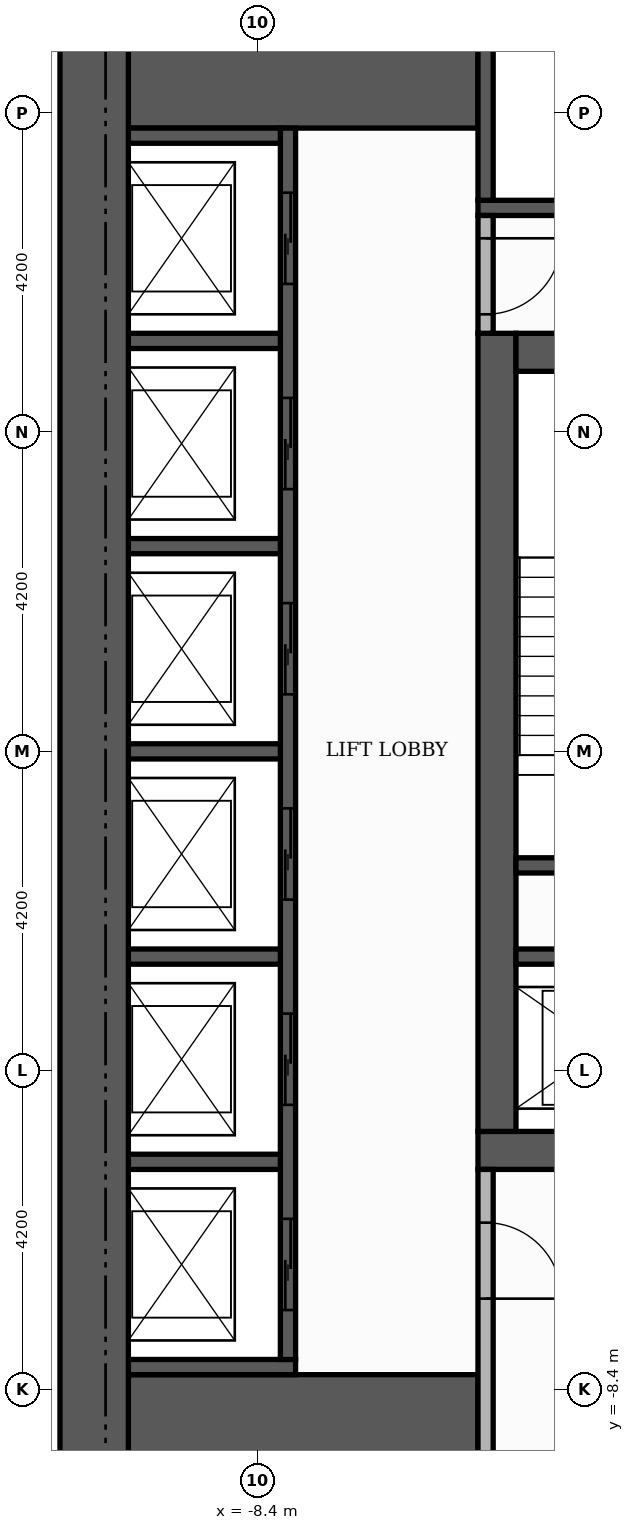
"""IFC4 building model, lengths in metres.
Left out: names, types, materials, properties, quantities, classifications, styles, units other than length and angle.
Written with IfcOpenShell. Run it as: python <this file> out.ifc"""

import sys

from ifc_helpers import new_model, si_unit, direction, frame, frame_2d, origin, place, context, subcontext, project, spatial, rectangle, extrude, element, fill, save


model = new_model("IFC4")
c1 = context("Model", 3, precision=1e-05, world=origin(), true_north=direction((0.0, 1.0)))
c2 = subcontext(c1, "Body", "Model", "MODEL_VIEW")
j1 = project(units=[si_unit("LENGTHUNIT", "METRE"), si_unit("PLANEANGLEUNIT", "RADIAN")], contexts=[c1])
p1 = place(None, origin())
s1 = spatial("IfcSite", under=j1, at=p1, CompositionType="ELEMENT")
p2 = place(p1, origin())
s2 = spatial("IfcBuilding", under=s1, at=p2, CompositionType="ELEMENT")
p3 = place(p2, frame((0.0, 0.0, 38.7)))
s3 = spatial("IfcBuildingStorey", under=s2, at=p3, CompositionType="ELEMENT", Elevation=38.7)
p4 = place(p3, frame((-5.5, -5.25, 0.0), z_axis=(0.0, 0.0, 1.0), x_axis=(1.0, 0.0, 0.0)))
e1 = element("IfcWall", 1, at=p4, inside=s3, PredefinedType="SHEAR", context=c2, shape_type="SweptSolid", body=[
    extrude(rectangle(XDim=11.0, YDim=0.5, at=frame_2d((5.5, 0.0))), origin(), (0.0, 0.0, 1.0), 3.48),
])
p5 = place(p4, frame((4.9, 0.0, 0.0)))
e2 = element("IfcOpeningElement", 2, at=p5, cuts=e1, PredefinedType="OPENING", context=c2, shape_type="SweptSolid", body=[
    extrude(rectangle(XDim=1.2, YDim=2.1, at=frame_2d((0.6, 1.05))), frame((0.0, 0.26, 0.0), z_axis=(0.0, -1.0, 0.0), x_axis=(1.0, 0.0, 0.0)), (0.0, 0.0, 1.0), 0.52),
])
p6 = place(p3, frame((-5.25, -5.0, 0.0), z_axis=(0.0, 0.0, 1.0), x_axis=(0.0, 1.0, 0.0)))
e3 = element("IfcWall", 3, at=p6, inside=s3, PredefinedType="SHEAR", context=c2, shape_type="SweptSolid", body=[
    extrude(rectangle(XDim=10.5, YDim=0.5, at=frame_2d((5.25, 0.0))), origin(), (0.0, 0.0, 1.0), 3.48),
])
p7 = place(p3, frame((-5.0, 5.25, 0.0), z_axis=(0.0, 0.0, 1.0), x_axis=(1.0, 0.0, 0.0)))
e4 = element("IfcWall", 4, at=p7, inside=s3, PredefinedType="SHEAR", context=c2, shape_type="SweptSolid", body=[
    extrude(rectangle(XDim=10.0, YDim=0.5, at=frame_2d((5.0, 0.0))), origin(), (0.0, 0.0, 1.0), 3.48),
])
p8 = place(p7, frame((4.4, 0.0, 0.0)))
e5 = element("IfcOpeningElement", 5, at=p8, cuts=e4, PredefinedType="OPENING", context=c2, shape_type="SweptSolid", body=[
    extrude(rectangle(XDim=1.2, YDim=2.1, at=frame_2d((0.6, 1.05))), frame((0.0, 0.26, 0.0), z_axis=(0.0, -1.0, 0.0), x_axis=(1.0, 0.0, 0.0)), (0.0, 0.0, 1.0), 0.52),
])
for number, where, z_axis, x_axis in (
    (6, (-10.1, -9.15, 0.0), (0.0, 0.0, 1.0), (1.0, 0.0, 0.0)),
    (7, (-10.1, 9.15, 0.0), (0.0, 0.0, 1.0), (1.0, 0.0, 0.0)),
):
    element("IfcWall", number, at=place(p3, frame(where, z_axis=z_axis, x_axis=x_axis)), inside=s3, PredefinedType="SHEAR", context=c2, shape_type="SweptSolid", body=[
        extrude(rectangle(XDim=4.6, YDim=1.9, at=frame_2d((2.3, 0.0))), origin(), (0.0, 0.0, 1.0), 3.48),
    ])
p9 = place(p3, frame((-5.0, -1.5, 0.0), z_axis=(0.0, 0.0, 1.0), x_axis=(1.0, 0.0, 0.0)))
e8 = element("IfcWall", 8, at=p9, inside=s3, PredefinedType="SHEAR", context=c2, shape_type="SweptSolid", body=[
    extrude(rectangle(XDim=3.05, YDim=0.2, at=frame_2d((1.525, 0.0))), origin(), (0.0, 0.0, 1.0), 3.48),
])
p10 = place(p3, frame((-5.5, 7.15, 0.0), z_axis=(0.0, 0.0, 1.0), x_axis=(1.0, 0.0, 0.0)))
e9 = element("IfcWall", 9, at=p10, inside=s3, PredefinedType="SHEAR", context=c2, shape_type="SweptSolid", body=[
    extrude(rectangle(XDim=6.8, YDim=0.2, at=frame_2d((3.4, 0.0))), origin(), (0.0, 0.0, 1.0), 3.48),
])
p11 = place(p3, frame((-5.4, 7.25, 0.0), z_axis=(0.0, 0.0, 1.0), x_axis=(0.0, 1.0, 0.0)))
e10 = element("IfcWall", 10, at=p11, inside=s3, PredefinedType="SHEAR", context=c2, shape_type="SweptSolid", body=[
    extrude(rectangle(XDim=2.85, YDim=0.2, at=frame_2d((1.425, 0.0))), origin(), (0.0, 0.0, 1.0), 3.48),
])
p12 = place(p3, frame((-10.1, -8.1, 0.0), z_axis=(0.0, 0.0, 1.0), x_axis=(1.0, 0.0, 0.0)))
e11 = element("IfcWall", 11, at=p12, inside=s3, PredefinedType="SHEAR", context=c2, shape_type="SweptSolid", body=[
    extrude(rectangle(XDim=2.2, YDim=0.2, at=frame_2d((1.1, 0.0))), origin(), (0.0, 0.0, 1.0), 3.48),
])
p13 = place(p3, frame((-8.0, -8.0, 0.0), z_axis=(0.0, 0.0, 1.0), x_axis=(0.0, 1.0, 0.0)))
e12 = element("IfcWall", 12, at=p13, inside=s3, PredefinedType="SHEAR", context=c2, shape_type="SweptSolid", body=[
    extrude(rectangle(XDim=16.2, YDim=0.2, at=frame_2d((8.1, 0.0))), origin(), (0.0, 0.0, 1.0), 3.48),
])
p14 = place(p13, frame((0.65, 0.0, 0.0)))
e13 = element("IfcOpeningElement", 13, at=p14, cuts=e12, PredefinedType="OPENING", context=c2, shape_type="SweptSolid", body=[
    extrude(rectangle(XDim=1.2, YDim=2.1, at=frame_2d((0.6, 1.05))), frame((0.0, 0.11, 0.0), z_axis=(0.0, -1.0, 0.0), x_axis=(1.0, 0.0, 0.0)), (0.0, 0.0, 1.0), 0.22),
])
p15 = place(p13, frame((3.35, 0.0, 0.0)))
e14 = element("IfcOpeningElement", 14, at=p15, cuts=e12, PredefinedType="OPENING", context=c2, shape_type="SweptSolid", body=[
    extrude(rectangle(XDim=1.2, YDim=2.1, at=frame_2d((0.6, 1.05))), frame((0.0, 0.11, 0.0), z_axis=(0.0, -1.0, 0.0), x_axis=(1.0, 0.0, 0.0)), (0.0, 0.0, 1.0), 0.22),
])
p16 = place(p13, frame((6.05, 0.0, 0.0)))
e15 = element("IfcOpeningElement", 15, at=p16, cuts=e12, PredefinedType="OPENING", context=c2, shape_type="SweptSolid", body=[
    extrude(rectangle(XDim=1.2, YDim=2.1, at=frame_2d((0.6, 1.05))), frame((0.0, 0.11, 0.0), z_axis=(0.0, -1.0, 0.0), x_axis=(1.0, 0.0, 0.0)), (0.0, 0.0, 1.0), 0.22),
])
p17 = place(p13, frame((8.75, 0.0, 0.0)))
e16 = element("IfcOpeningElement", 16, at=p17, cuts=e12, PredefinedType="OPENING", context=c2, shape_type="SweptSolid", body=[
    extrude(rectangle(XDim=1.2, YDim=2.1, at=frame_2d((0.6, 1.05))), frame((0.0, 0.11, 0.0), z_axis=(0.0, -1.0, 0.0), x_axis=(1.0, 0.0, 0.0)), (0.0, 0.0, 1.0), 0.22),
])
p18 = place(p13, frame((11.45, 0.0, 0.0)))
e17 = element("IfcOpeningElement", 17, at=p18, cuts=e12, PredefinedType="OPENING", context=c2, shape_type="SweptSolid", body=[
    extrude(rectangle(XDim=1.2, YDim=2.1, at=frame_2d((0.6, 1.05))), frame((0.0, 0.11, 0.0), z_axis=(0.0, -1.0, 0.0), x_axis=(1.0, 0.0, 0.0)), (0.0, 0.0, 1.0), 0.22),
])
p19 = place(p13, frame((14.15, 0.0, 0.0)))
e18 = element("IfcOpeningElement", 18, at=p19, cuts=e12, PredefinedType="OPENING", context=c2, shape_type="SweptSolid", body=[
    extrude(rectangle(XDim=1.2, YDim=2.1, at=frame_2d((0.6, 1.05))), frame((0.0, 0.11, 0.0), z_axis=(0.0, -1.0, 0.0), x_axis=(1.0, 0.0, 0.0)), (0.0, 0.0, 1.0), 0.22),
])
for number, where, z_axis, x_axis in (
    (19, (-10.1, -5.4, 0.0), (0.0, 0.0, 1.0), (1.0, 0.0, 0.0)),
    (20, (-10.1, -2.7, 0.0), (0.0, 0.0, 1.0), (1.0, 0.0, 0.0)),
):
    element("IfcWall", number, at=place(p3, frame(where, z_axis=z_axis, x_axis=x_axis)), inside=s3, PredefinedType="SHEAR", context=c2, shape_type="SweptSolid", body=[
        extrude(rectangle(XDim=2.0, YDim=0.2, at=frame_2d((1.0, 0.0))), origin(), (0.0, 0.0, 1.0), 3.48),
    ])
p20 = place(p3, frame((-5.0, -2.7, 0.0), z_axis=(0.0, 0.0, 1.0), x_axis=(1.0, 0.0, 0.0)))
e21 = element("IfcWall", 21, at=p20, inside=s3, PredefinedType="SHEAR", context=c2, shape_type="SweptSolid", body=[
    extrude(rectangle(XDim=2.85, YDim=0.2, at=frame_2d((1.425, 0.0))), origin(), (0.0, 0.0, 1.0), 3.48),
])
for number, where, z_axis, x_axis in (
    (22, (-10.1, 0.0, 0.0), (0.0, 0.0, 1.0), (1.0, 0.0, 0.0)),
    (23, (-10.1, 2.7, 0.0), (0.0, 0.0, 1.0), (1.0, 0.0, 0.0)),
    (24, (-10.1, 5.4, 0.0), (0.0, 0.0, 1.0), (1.0, 0.0, 0.0)),
    (25, (-10.1, 8.1, 0.0), (0.0, 0.0, 1.0), (1.0, 0.0, 0.0)),
):
    element("IfcWall", number, at=place(p3, frame(where, z_axis=z_axis, x_axis=x_axis)), inside=s3, PredefinedType="SHEAR", context=c2, shape_type="SweptSolid", body=[
        extrude(rectangle(XDim=2.0, YDim=0.2, at=frame_2d((1.0, 0.0))), origin(), (0.0, 0.0, 1.0), 3.48),
    ])
p21 = place(p3, frame((-10.55, -10.1, 0.0), z_axis=(0.0, 0.0, 1.0), x_axis=(0.0, 1.0, 0.0)))
e26 = element("IfcWall", 26, at=p21, inside=s3, PredefinedType="SHEAR", context=c2, shape_type="SweptSolid", body=[
    extrude(rectangle(XDim=20.2, YDim=0.9, at=frame_2d((10.1, 0.0))), origin(), (0.0, 0.0, 1.0), 3.48),
])
p22 = place(p3, frame((-5.4, -10.1, 0.0), z_axis=(0.0, 0.0, 1.0), x_axis=(0.0, 1.0, 0.0)))
e27 = element("IfcWall", 27, at=p22, inside=s3, PredefinedType="PARTITIONING", context=c2, shape_type="SweptSolid", body=[
    extrude(rectangle(XDim=4.6, YDim=0.2, at=frame_2d((2.3, 0.0))), origin(), (0.0, 0.0, 1.0), 3.48),
])
p23 = place(p22, frame((2.9, 0.0, 0.0)))
e28 = element("IfcOpeningElement", 28, at=p23, cuts=e27, PredefinedType="OPENING", context=c2, shape_type="SweptSolid", body=[
    extrude(rectangle(XDim=1.0, YDim=2.1, at=frame_2d((0.5, 1.05))), frame((0.0, 0.11, 0.0), z_axis=(0.0, -1.0, 0.0), x_axis=(1.0, 0.0, 0.0)), (0.0, 0.0, 1.0), 0.22),
])
p24 = place(p3, frame((-5.4, 5.5, 0.0), z_axis=(0.0, 0.0, 1.0), x_axis=(0.0, 1.0, 0.0)))
e29 = element("IfcWall", 29, at=p24, inside=s3, PredefinedType="PARTITIONING", context=c2, shape_type="SweptSolid", body=[
    extrude(rectangle(XDim=1.55, YDim=0.2, at=frame_2d((0.775, 0.0))), origin(), (0.0, 0.0, 1.0), 3.48),
])
p25 = place(p24, frame((0.25, 0.0, 0.0)))
e30 = element("IfcOpeningElement", 30, at=p25, cuts=e29, PredefinedType="OPENING", context=c2, shape_type="SweptSolid", body=[
    extrude(rectangle(XDim=1.0, YDim=2.1, at=frame_2d((0.5, 1.05))), frame((0.0, 0.11, 0.0), z_axis=(0.0, -1.0, 0.0), x_axis=(1.0, 0.0, 0.0)), (0.0, 0.0, 1.0), 0.22),
])
p26 = place(p14, origin())
e31 = element("IfcDoor", 31, at=p26, inside=s3, OperationType="SLIDING_TO_LEFT", PredefinedType="DOOR", context=c2, shape_type="SweptSolid", body=[
    extrude(rectangle(XDim=1.2, YDim=2.1, at=frame_2d((0.6, 1.05))), frame((0.0, 0.025, 0.0), z_axis=(0.0, -1.0, 0.0), x_axis=(1.0, 0.0, 0.0)), (0.0, 0.0, 1.0), 0.05),
])
fill(e13, e31)
p27 = place(p15, origin())
e32 = element("IfcDoor", 32, at=p27, inside=s3, OperationType="SLIDING_TO_LEFT", PredefinedType="DOOR", context=c2, shape_type="SweptSolid", body=[
    extrude(rectangle(XDim=1.2, YDim=2.1, at=frame_2d((0.6, 1.05))), frame((0.0, 0.025, 0.0), z_axis=(0.0, -1.0, 0.0), x_axis=(1.0, 0.0, 0.0)), (0.0, 0.0, 1.0), 0.05),
])
fill(e14, e32)
p28 = place(p16, origin())
e33 = element("IfcDoor", 33, at=p28, inside=s3, OperationType="SLIDING_TO_LEFT", PredefinedType="DOOR", context=c2, shape_type="SweptSolid", body=[
    extrude(rectangle(XDim=1.2, YDim=2.1, at=frame_2d((0.6, 1.05))), frame((0.0, 0.025, 0.0), z_axis=(0.0, -1.0, 0.0), x_axis=(1.0, 0.0, 0.0)), (0.0, 0.0, 1.0), 0.05),
])
fill(e15, e33)
p29 = place(p17, origin())
e34 = element("IfcDoor", 34, at=p29, inside=s3, OperationType="SLIDING_TO_LEFT", PredefinedType="DOOR", context=c2, shape_type="SweptSolid", body=[
    extrude(rectangle(XDim=1.2, YDim=2.1, at=frame_2d((0.6, 1.05))), frame((0.0, 0.025, 0.0), z_axis=(0.0, -1.0, 0.0), x_axis=(1.0, 0.0, 0.0)), (0.0, 0.0, 1.0), 0.05),
])
fill(e16, e34)
p30 = place(p18, origin())
e35 = element("IfcDoor", 35, at=p30, inside=s3, OperationType="SLIDING_TO_LEFT", PredefinedType="DOOR", context=c2, shape_type="SweptSolid", body=[
    extrude(rectangle(XDim=1.2, YDim=2.1, at=frame_2d((0.6, 1.05))), frame((0.0, 0.025, 0.0), z_axis=(0.0, -1.0, 0.0), x_axis=(1.0, 0.0, 0.0)), (0.0, 0.0, 1.0), 0.05),
])
fill(e17, e35)
p31 = place(p19, origin())
e36 = element("IfcDoor", 36, at=p31, inside=s3, OperationType="SLIDING_TO_LEFT", PredefinedType="DOOR", context=c2, shape_type="SweptSolid", body=[
    extrude(rectangle(XDim=1.2, YDim=2.1, at=frame_2d((0.6, 1.05))), frame((0.0, 0.025, 0.0), z_axis=(0.0, -1.0, 0.0), x_axis=(1.0, 0.0, 0.0)), (0.0, 0.0, 1.0), 0.05),
])
fill(e18, e36)
p32 = place(p25, frame((1.0, 0.0, 0.0), z_axis=(0.0, 0.0, 1.0), x_axis=(-1.0, 0.0, 0.0)))
e37 = element("IfcDoor", 37, at=p32, inside=s3, OperationType="SINGLE_SWING_RIGHT", PredefinedType="DOOR", context=c2, shape_type="SweptSolid", body=[
    extrude(rectangle(XDim=1.0, YDim=2.1, at=frame_2d((0.5, 1.05))), frame((0.0, 0.025, 0.0), z_axis=(0.0, -1.0, 0.0), x_axis=(1.0, 0.0, 0.0)), (0.0, 0.0, 1.0), 0.05),
])
fill(e30, e37)
p33 = place(p23, frame((1.0, 0.0, 0.0), z_axis=(0.0, 0.0, 1.0), x_axis=(-1.0, 0.0, 0.0)))
e38 = element("IfcDoor", 38, at=p33, inside=s3, OperationType="SINGLE_SWING_LEFT", PredefinedType="DOOR", context=c2, shape_type="SweptSolid", body=[
    extrude(rectangle(XDim=1.0, YDim=2.1, at=frame_2d((0.5, 1.05))), frame((0.0, 0.025, 0.0), z_axis=(0.0, -1.0, 0.0), x_axis=(1.0, 0.0, 0.0)), (0.0, 0.0, 1.0), 0.05),
])
fill(e28, e38)
save(model, sys.argv[1])
